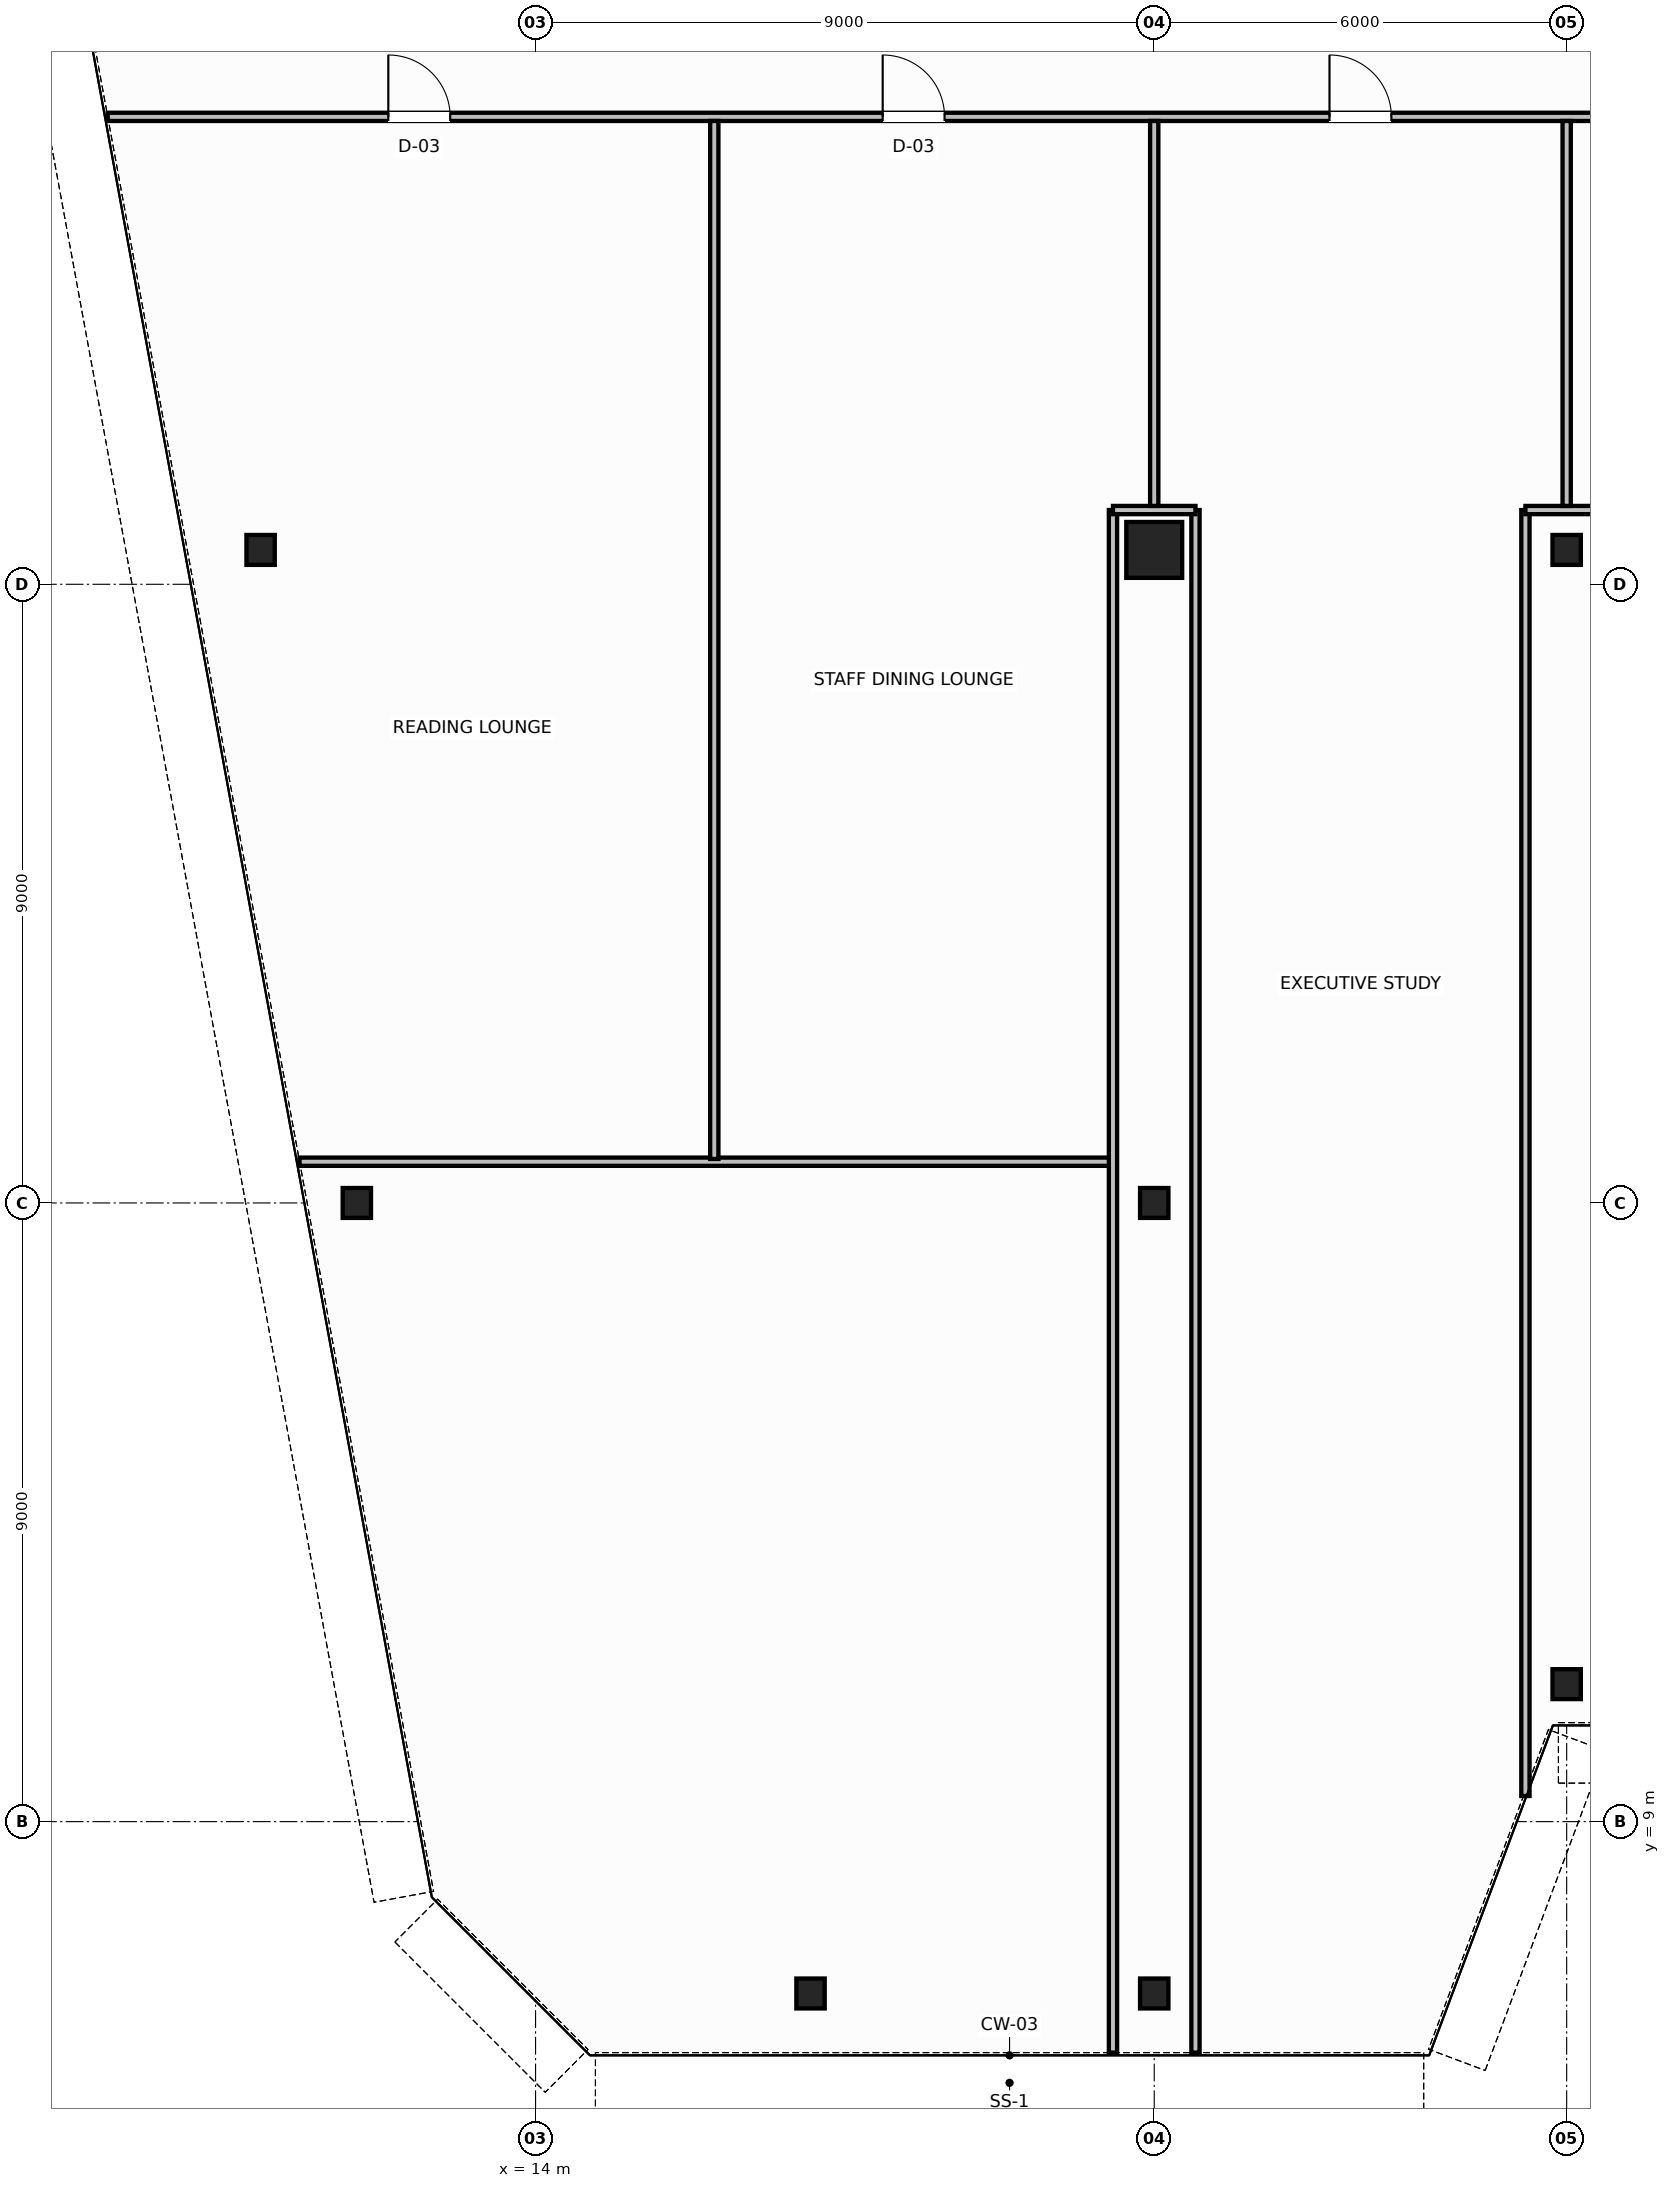
"""IFC4 building model, lengths in metres.
Left out: names, types, materials, properties, quantities, classifications, styles, units other than length and angle.
Written with IfcOpenShell. Run it as: python <this file> out.ifc"""

import sys

from ifc_helpers import new_model, si_unit, direction, frame, frame_2d, origin, origin_2d, place, context, subcontext, project, spatial, rectangle, hollow_circle, i_section, extrude, source, transform, mapped, element, fill, save


model = new_model("IFC4")
c1 = context("Model", 3, precision=1e-05, world=origin(), true_north=direction((0.0, 1.0)))
c2 = subcontext(c1, "Body", "Model", "MODEL_VIEW")
j1 = project(units=[si_unit("LENGTHUNIT", "METRE"), si_unit("PLANEANGLEUNIT", "RADIAN")], contexts=[c1])
p1 = place(None, origin())
s1 = spatial("IfcSite", under=j1, at=p1, CompositionType="ELEMENT")
p2 = place(p1, origin())
s2 = spatial("IfcBuilding", under=s1, at=p2, CompositionType="ELEMENT")
p3 = place(p2, frame((0.0, 0.0, 203.2)))
s3 = spatial("IfcBuildingStorey", under=s2, at=p3, CompositionType="ELEMENT", Elevation=203.2)
m1 = source(origin(), c2, "Body", "SweptSolid", [
    extrude(i_section(OverallWidth=0.412, OverallDepth=0.435, WebThickness=0.036, FlangeThickness=0.05, FilletRadius=0.015, at=origin_2d()), origin(), (0.0, 0.0, 1.0), 3.8),
])
for number, where, z_axis, x_axis in (
    (1, (10.0, 27.5, 0.0), (0.0, 0.0, 1.0), (1.0, 0.0, 0.0)),
    (2, (11.4, 18.0, 0.0), (0.0, 0.0, 1.0), (1.0, 0.0, 0.0)),
):
    element("IfcColumn", number, at=place(p3, frame(where, z_axis=z_axis, x_axis=x_axis)), inside=s3, PredefinedType="COLUMN", context=c2, shape_type="MappedRepresentation", body=[
        mapped(m1, transform((0.0, 0.0, 0.0), scale=1.0)),
    ])
m2 = source(origin(), c2, "Body", "SweptSolid", [
    extrude(hollow_circle(Radius=0.406, WallThickness=0.04, at=origin_2d()), origin(), (0.0, 0.0, 1.0), 3.8),
])
p4 = place(p3, frame((23.0, 27.5, 0.0), z_axis=(0.0, 0.0, 1.0), x_axis=(1.0, 0.0, 0.0)))
e3 = element("IfcColumn", 3, at=p4, inside=s3, PredefinedType="COLUMN", context=c2, shape_type="MappedRepresentation", body=[
    mapped(m2, transform((0.0, 0.0, 0.0), scale=1.0)),
])
m3 = source(origin(), c2, "Body", "SweptSolid", [
    extrude(i_section(OverallWidth=0.412, OverallDepth=0.435, WebThickness=0.036, FlangeThickness=0.05, FilletRadius=0.015, at=origin_2d()), origin(), (0.0, 0.0, 1.0), 3.8),
])
for number, where, z_axis, x_axis in (
    (4, (29.0, 27.5, 0.0), (0.0, 0.0, 1.0), (1.0, 0.0, 0.0)),
    (5, (23.0, 18.0, 0.0), (0.0, 0.0, 1.0), (1.0, 0.0, 0.0)),
    (6, (18.0, 6.5, 0.0), (0.0, 0.0, 1.0), (1.0, 0.0, 0.0)),
    (7, (23.0, 6.5, 0.0), (0.0, 0.0, 1.0), (1.0, 0.0, 0.0)),
    (8, (29.0, 11.0, 0.0), (0.0, 0.0, 1.0), (1.0, 0.0, 0.0)),
):
    element("IfcColumn", number, at=place(p3, frame(where, z_axis=z_axis, x_axis=x_axis)), inside=s3, PredefinedType="COLUMN", context=c2, shape_type="MappedRepresentation", body=[
        mapped(m3, transform((0.0, 0.0, 0.0), scale=1.0)),
    ])
p5 = place(p3, frame((7.776, 33.8, 0.0), z_axis=(0.0, 0.0, 1.0), x_axis=(1.0, 0.0, 0.0)))
e9 = element("IfcWall", 9, at=p5, inside=s3, PredefinedType="PARTITIONING", context=c2, shape_type="SweptSolid", body=[
    extrude(rectangle(XDim=52.449, YDim=0.12, at=frame_2d((26.224, 0.0))), origin(), (0.0, 0.0, 1.0), 3.58),
])
p6 = place(p5, frame((4.082, 0.0, 0.0)))
e10 = element("IfcOpeningElement", 10, at=p6, cuts=e9, PredefinedType="OPENING", context=c2, shape_type="SweptSolid", body=[
    extrude(rectangle(XDim=0.9, YDim=2.15, at=frame_2d((0.45, 1.075))), frame((0.0, 0.07, 0.0), z_axis=(0.0, -1.0, 0.0), x_axis=(1.0, 0.0, 0.0)), (0.0, 0.0, 1.0), 0.14),
])
p7 = place(p5, frame((11.274, 0.0, 0.0)))
e11 = element("IfcOpeningElement", 11, at=p7, cuts=e9, PredefinedType="OPENING", context=c2, shape_type="SweptSolid", body=[
    extrude(rectangle(XDim=0.9, YDim=2.15, at=frame_2d((0.45, 1.075))), frame((0.0, 0.07, 0.0), z_axis=(0.0, -1.0, 0.0), x_axis=(1.0, 0.0, 0.0)), (0.0, 0.0, 1.0), 0.14),
])
p8 = place(p5, frame((17.774, 0.0, 0.0)))
e12 = element("IfcOpeningElement", 12, at=p8, cuts=e9, PredefinedType="OPENING", context=c2, shape_type="SweptSolid", body=[
    extrude(rectangle(XDim=0.9, YDim=2.15, at=frame_2d((0.45, 1.075))), frame((0.0, 0.07, 0.0), z_axis=(0.0, -1.0, 0.0), x_axis=(1.0, 0.0, 0.0)), (0.0, 0.0, 1.0), 0.14),
])
p9 = place(p5, frame((25.774, 0.0, 0.0)))
e13 = element("IfcOpeningElement", 13, at=p9, cuts=e9, PredefinedType="OPENING", context=c2, shape_type="SweptSolid", body=[
    extrude(rectangle(XDim=0.9, YDim=2.15, at=frame_2d((0.45, 1.075))), frame((0.0, 0.07, 0.0), z_axis=(0.0, -1.0, 0.0), x_axis=(1.0, 0.0, 0.0)), (0.0, 0.0, 1.0), 0.14),
])
p10 = place(p5, frame((33.774, 0.0, 0.0)))
e14 = element("IfcOpeningElement", 14, at=p10, cuts=e9, PredefinedType="OPENING", context=c2, shape_type="SweptSolid", body=[
    extrude(rectangle(XDim=0.9, YDim=2.15, at=frame_2d((0.45, 1.075))), frame((0.0, 0.07, 0.0), z_axis=(0.0, -1.0, 0.0), x_axis=(1.0, 0.0, 0.0)), (0.0, 0.0, 1.0), 0.14),
])
p11 = place(p5, frame((40.174, 0.0, 0.0)))
e15 = element("IfcOpeningElement", 15, at=p11, cuts=e9, PredefinedType="OPENING", context=c2, shape_type="SweptSolid", body=[
    extrude(rectangle(XDim=0.9, YDim=2.15, at=frame_2d((0.45, 1.075))), frame((0.0, 0.07, 0.0), z_axis=(0.0, -1.0, 0.0), x_axis=(1.0, 0.0, 0.0)), (0.0, 0.0, 1.0), 0.14),
])
p12 = place(p5, frame((47.366, 0.0, 0.0)))
e16 = element("IfcOpeningElement", 16, at=p12, cuts=e9, PredefinedType="OPENING", context=c2, shape_type="SweptSolid", body=[
    extrude(rectangle(XDim=0.9, YDim=2.15, at=frame_2d((0.45, 1.075))), frame((0.0, 0.07, 0.0), z_axis=(0.0, -1.0, 0.0), x_axis=(1.0, 0.0, 0.0)), (0.0, 0.0, 1.0), 0.14),
])
p13 = place(p3, frame((10.566, 18.6, 0.0), z_axis=(0.0, 0.0, 1.0), x_axis=(1.0, 0.0, 0.0)))
e17 = element("IfcWall", 17, at=p13, inside=s3, PredefinedType="PARTITIONING", context=c2, shape_type="SweptSolid", body=[
    extrude(rectangle(XDim=11.794, YDim=0.12, at=frame_2d((5.897, 0.0))), origin(), (0.0, 0.0, 1.0), 3.58),
])
for number, where, z_axis, x_axis in (
    (18, (22.4, 5.64, 0.0), (0.0, 0.0, 1.0), (0.0, 1.0, 0.0)),
    (19, (23.6, 5.64, 0.0), (0.0, 0.0, 1.0), (0.0, 1.0, 0.0)),
):
    element("IfcWall", number, at=place(p3, frame(where, z_axis=z_axis, x_axis=x_axis)), inside=s3, PredefinedType="PARTITIONING", context=c2, shape_type="SweptSolid", body=[
        extrude(rectangle(XDim=22.44, YDim=0.12, at=frame_2d((11.22, 0.0))), origin(), (0.0, 0.0, 1.0), 3.58),
    ])
p14 = place(p3, frame((22.4, 28.08, 0.0), z_axis=(0.0, 0.0, 1.0), x_axis=(1.0, 0.0, 0.0)))
e20 = element("IfcWall", 20, at=p14, inside=s3, PredefinedType="PARTITIONING", context=c2, shape_type="SweptSolid", body=[
    extrude(rectangle(XDim=1.2, YDim=0.12, at=frame_2d((0.6, 0.0))), origin(), (0.0, 0.0, 1.0), 3.58),
])
p15 = place(p3, frame((23.0, 28.14, 0.0), z_axis=(0.0, 0.0, 1.0), x_axis=(0.0, 1.0, 0.0)))
e21 = element("IfcWall", 21, at=p15, inside=s3, PredefinedType="PARTITIONING", context=c2, shape_type="SweptSolid", body=[
    extrude(rectangle(XDim=5.6, YDim=0.12, at=frame_2d((2.8, 0.0))), origin(), (0.0, 0.0, 1.0), 2.37),
])
p16 = place(p3, frame((28.4, 9.373, 0.0), z_axis=(0.0, 0.0, 1.0), x_axis=(0.0, 1.0, 0.0)))
e22 = element("IfcWall", 22, at=p16, inside=s3, PredefinedType="PARTITIONING", context=c2, shape_type="SweptSolid", body=[
    extrude(rectangle(XDim=18.707, YDim=0.12, at=frame_2d((9.354, 0.0))), origin(), (0.0, 0.0, 1.0), 3.58),
])
p17 = place(p3, frame((28.4, 28.08, 0.0), z_axis=(0.0, 0.0, 1.0), x_axis=(1.0, 0.0, 0.0)))
e23 = element("IfcWall", 23, at=p17, inside=s3, PredefinedType="PARTITIONING", context=c2, shape_type="SweptSolid", body=[
    extrude(rectangle(XDim=1.2, YDim=0.12, at=frame_2d((0.6, 0.0))), origin(), (0.0, 0.0, 1.0), 3.58),
])
p18 = place(p3, frame((29.0, 28.14, 0.0), z_axis=(0.0, 0.0, 1.0), x_axis=(0.0, 1.0, 0.0)))
e24 = element("IfcWall", 24, at=p18, inside=s3, PredefinedType="PARTITIONING", context=c2, shape_type="SweptSolid", body=[
    extrude(rectangle(XDim=5.6, YDim=0.12, at=frame_2d((2.8, 0.0))), origin(), (0.0, 0.0, 1.0), 2.37),
])
p19 = place(p3, frame((16.6, 18.64, 0.0), z_axis=(0.0, 0.0, 1.0), x_axis=(0.0, 1.0, 0.0)))
e25 = element("IfcWall", 25, at=p19, inside=s3, PredefinedType="PARTITIONING", context=c2, shape_type="SweptSolid", body=[
    extrude(rectangle(XDim=15.1, YDim=0.12, at=frame_2d((7.55, 0.0))), origin(), (0.0, 0.0, 1.0), 3.58),
])
m4 = source(origin(), c2, "Body", "SweptSolid", [
    extrude(rectangle(XDim=0.9, YDim=2.15, at=frame_2d((0.45, 1.075))), frame((0.0, 0.025, 0.0), z_axis=(0.0, -1.0, 0.0), x_axis=(1.0, 0.0, 0.0)), (0.0, 0.0, 1.0), 0.05),
])
p20 = place(p6, origin())
e26 = element("IfcDoor", 26, at=p20, inside=s3, OperationType="SINGLE_SWING_LEFT", PredefinedType="DOOR", context=c2, shape_type="MappedRepresentation", body=[
    mapped(m4, transform((0.0, 0.0, 0.0), scale=1.0)),
])
fill(e10, e26)
p21 = place(p7, origin())
e27 = element("IfcDoor", 27, at=p21, inside=s3, OperationType="SINGLE_SWING_RIGHT", PredefinedType="DOOR", context=c2, shape_type="MappedRepresentation", body=[
    mapped(m4, transform((0.0, 0.0, 0.0), scale=1.0)),
])
fill(e11, e27)
p22 = place(p8, origin())
e28 = element("IfcDoor", 28, at=p22, inside=s3, OperationType="SINGLE_SWING_LEFT", PredefinedType="DOOR", context=c2, shape_type="MappedRepresentation", body=[
    mapped(m4, transform((0.0, 0.0, 0.0), scale=1.0)),
])
fill(e12, e28)
save(model, sys.argv[1])
